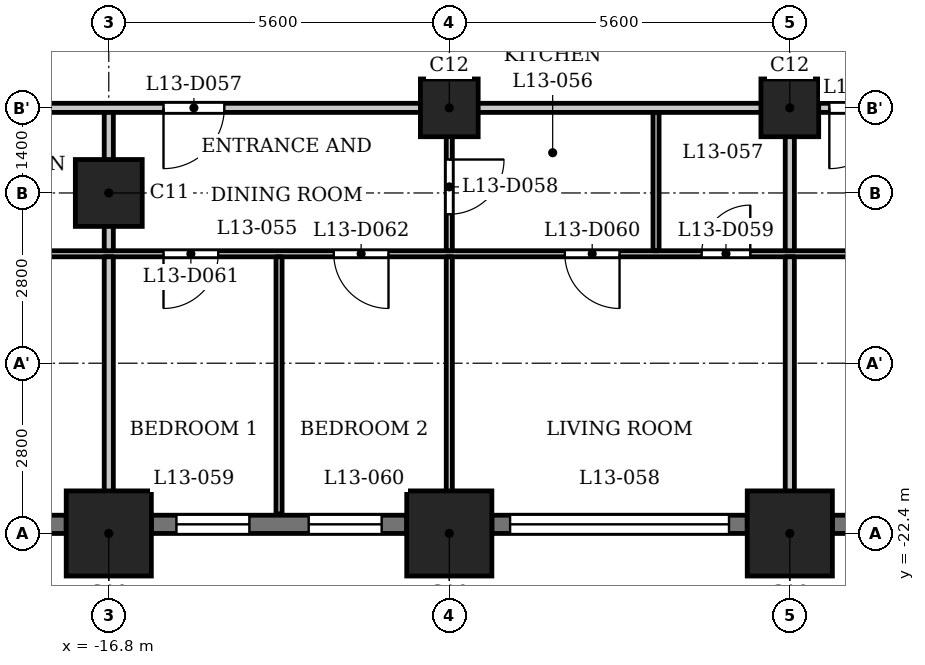
"""IFC4 building model, lengths in metres.
Left out: names, types, materials, properties, quantities, classifications, styles, units other than length and angle.
Written with IfcOpenShell. Run it as: python <this file> out.ifc"""

import sys

from ifc_helpers import new_model, si_unit, direction, frame, frame_2d, origin, origin_2d, place, context, subcontext, project, spatial, rectangle, extrude, element, fill, save


model = new_model("IFC4")
c1 = context("Model", 3, precision=1e-05, world=origin(), true_north=direction((0.0, 1.0)))
c2 = subcontext(c1, "Body", "Model", "MODEL_VIEW")
j1 = project(units=[si_unit("LENGTHUNIT", "METRE"), si_unit("PLANEANGLEUNIT", "RADIAN")], contexts=[c1])
p1 = place(None, origin())
s1 = spatial("IfcSite", under=j1, at=p1, CompositionType="ELEMENT")
p2 = place(p1, origin())
s2 = spatial("IfcBuilding", under=s1, at=p2, CompositionType="ELEMENT")
p3 = place(p2, frame((0.0, 0.0, 55.0)))
s3 = spatial("IfcBuildingStorey", under=s2, at=p3, CompositionType="ELEMENT", Elevation=55.0)
for number, where, z_axis, x_axis in (
    (1, (-16.8, -22.4, 0.0), (0.0, 0.0, 1.0), (1.0, 0.0, 0.0)),
    (2, (-11.2, -22.4, 0.0), (0.0, 0.0, 1.0), (1.0, 0.0, 0.0)),
    (3, (-5.6, -22.4, 0.0), (0.0, 0.0, 1.0), (1.0, 0.0, 0.0)),
):
    element("IfcColumn", number, at=place(p3, frame(where, z_axis=z_axis, x_axis=x_axis)), inside=s3, PredefinedType="COLUMN", context=c2, shape_type="SweptSolid", body=[
        extrude(rectangle(XDim=1.4, YDim=1.4, at=origin_2d()), origin(), (0.0, 0.0, 1.0), 3.5),
    ])
p4 = place(p3, frame((-16.8, -16.8, 0.0), z_axis=(0.0, 0.0, 1.0), x_axis=(1.0, 0.0, 0.0)))
e4 = element("IfcColumn", 4, at=p4, inside=s3, PredefinedType="COLUMN", context=c2, shape_type="SweptSolid", body=[
    extrude(rectangle(XDim=1.1, YDim=1.1, at=origin_2d()), origin(), (0.0, 0.0, 1.0), 3.5),
])
for number, where, z_axis, x_axis in (
    (5, (-11.2, -15.4, 0.0), (0.0, 0.0, 1.0), (1.0, 0.0, 0.0)),
    (6, (-5.6, -15.4, 0.0), (0.0, 0.0, 1.0), (1.0, 0.0, 0.0)),
):
    element("IfcColumn", number, at=place(p3, frame(where, z_axis=z_axis, x_axis=x_axis)), inside=s3, PredefinedType="COLUMN", context=c2, shape_type="SweptSolid", body=[
        extrude(rectangle(XDim=0.95, YDim=0.95, at=origin_2d()), origin(), (0.0, 0.0, 1.0), 3.5),
    ])
p5 = place(p3, frame((-20.0, -22.25, 0.0), z_axis=(0.0, 0.0, 1.0), x_axis=(1.0, 0.0, 0.0)))
e7 = element("IfcWall", 7, at=p5, inside=s3, PredefinedType="SOLIDWALL", context=c2, shape_type="SweptSolid", body=[
    extrude(rectangle(XDim=2.5, YDim=0.3, at=frame_2d((1.25, 0.0))), origin(), (0.0, 0.0, 1.0), 2.35),
])
p6 = place(p5, frame((0.65, 0.0, 0.6)))
e8 = element("IfcOpeningElement", 8, at=p6, cuts=e7, PredefinedType="OPENING", context=c2, shape_type="SweptSolid", body=[
    extrude(rectangle(XDim=1.2, YDim=1.55, at=frame_2d((0.6, 0.775))), frame((0.0, 0.16, 0.0), z_axis=(0.0, -1.0, 0.0), x_axis=(1.0, 0.0, 0.0)), (0.0, 0.0, 1.0), 0.32),
])
p7 = place(p3, frame((-16.1, -22.25, 0.0), z_axis=(0.0, 0.0, 1.0), x_axis=(1.0, 0.0, 0.0)))
e9 = element("IfcWall", 9, at=p7, inside=s3, PredefinedType="SOLIDWALL", context=c2, shape_type="SweptSolid", body=[
    extrude(rectangle(XDim=4.2, YDim=0.3, at=frame_2d((2.1, 0.0))), origin(), (0.0, 0.0, 1.0), 2.35),
])
p8 = place(p7, frame((0.413, 0.0, 0.6)))
e10 = element("IfcOpeningElement", 10, at=p8, cuts=e9, PredefinedType="OPENING", context=c2, shape_type="SweptSolid", body=[
    extrude(rectangle(XDim=1.2, YDim=1.55, at=frame_2d((0.6, 0.775))), frame((0.0, 0.16, 0.0), z_axis=(0.0, -1.0, 0.0), x_axis=(1.0, 0.0, 0.0)), (0.0, 0.0, 1.0), 0.32),
])
p9 = place(p7, frame((2.587, 0.0, 0.6)))
e11 = element("IfcOpeningElement", 11, at=p9, cuts=e9, PredefinedType="OPENING", context=c2, shape_type="SweptSolid", body=[
    extrude(rectangle(XDim=1.2, YDim=1.55, at=frame_2d((0.6, 0.775))), frame((0.0, 0.16, 0.0), z_axis=(0.0, -1.0, 0.0), x_axis=(1.0, 0.0, 0.0)), (0.0, 0.0, 1.0), 0.32),
])
p10 = place(p3, frame((-10.5, -22.25, 0.0), z_axis=(0.0, 0.0, 1.0), x_axis=(1.0, 0.0, 0.0)))
e12 = element("IfcWall", 12, at=p10, inside=s3, PredefinedType="SOLIDWALL", context=c2, shape_type="SweptSolid", body=[
    extrude(rectangle(XDim=4.2, YDim=0.3, at=frame_2d((2.1, 0.0))), origin(), (0.0, 0.0, 1.0), 2.35),
])
p11 = place(p10, frame((0.3, 0.0, 1.2)))
e13 = element("IfcOpeningElement", 13, at=p11, cuts=e12, PredefinedType="OPENING", context=c2, shape_type="SweptSolid", body=[
    extrude(rectangle(XDim=3.6, YDim=0.95, at=frame_2d((1.8, 0.475))), frame((0.0, 0.16, 0.0), z_axis=(0.0, -1.0, 0.0), x_axis=(1.0, 0.0, 0.0)), (0.0, 0.0, 1.0), 0.32),
])
p12 = place(p3, frame((-4.9, -22.25, 0.0), z_axis=(0.0, 0.0, 1.0), x_axis=(1.0, 0.0, 0.0)))
e14 = element("IfcWall", 14, at=p12, inside=s3, PredefinedType="SOLIDWALL", context=c2, shape_type="SweptSolid", body=[
    extrude(rectangle(XDim=4.2, YDim=0.3, at=frame_2d((2.1, 0.0))), origin(), (0.0, 0.0, 1.0), 2.35),
])
p13 = place(p12, frame((0.3, 0.0, 1.2)))
e15 = element("IfcOpeningElement", 15, at=p13, cuts=e14, PredefinedType="OPENING", context=c2, shape_type="SweptSolid", body=[
    extrude(rectangle(XDim=3.6, YDim=0.95, at=frame_2d((1.8, 0.475))), frame((0.0, 0.16, 0.0), z_axis=(0.0, -1.0, 0.0), x_axis=(1.0, 0.0, 0.0)), (0.0, 0.0, 1.0), 0.32),
])
p14 = place(p3, frame((-26.394, -17.8, 0.0), z_axis=(0.0, 0.0, 1.0), x_axis=(1.0, 0.0, 0.0)))
e16 = element("IfcWall", 16, at=p14, inside=s3, PredefinedType="PARTITIONING", context=c2, shape_type="SweptSolid", body=[
    extrude(rectangle(XDim=53.034, YDim=0.1, at=frame_2d((26.517, 0.0))), origin(), (0.0, 0.0, 1.0), 3.2),
])
p15 = place(p14, frame((0.794, 0.0, 0.0)))
e17 = element("IfcOpeningElement", 17, at=p15, cuts=e16, PredefinedType="OPENING", context=c2, shape_type="SweptSolid", body=[
    extrude(rectangle(XDim=0.8, YDim=2.1, at=frame_2d((0.4, 1.05))), frame((0.0, 0.06, 0.0), z_axis=(0.0, -1.0, 0.0), x_axis=(1.0, 0.0, 0.0)), (0.0, 0.0, 1.0), 0.12),
])
p16 = place(p14, frame((5.644, 0.0, 0.0)))
e18 = element("IfcOpeningElement", 18, at=p16, cuts=e16, PredefinedType="OPENING", context=c2, shape_type="SweptSolid", body=[
    extrude(rectangle(XDim=0.9, YDim=2.1, at=frame_2d((0.45, 1.05))), frame((0.0, 0.06, 0.0), z_axis=(0.0, -1.0, 0.0), x_axis=(1.0, 0.0, 0.0)), (0.0, 0.0, 1.0), 0.12),
])
p17 = place(p14, frame((19.344, 0.0, 0.0)))
e19 = element("IfcOpeningElement", 19, at=p17, cuts=e16, PredefinedType="OPENING", context=c2, shape_type="SweptSolid", body=[
    extrude(rectangle(XDim=0.8, YDim=2.1, at=frame_2d((0.4, 1.05))), frame((0.0, 0.06, 0.0), z_axis=(0.0, -1.0, 0.0), x_axis=(1.0, 0.0, 0.0)), (0.0, 0.0, 1.0), 0.12),
])
p18 = place(p14, frame((17.094, 0.0, 0.0)))
e20 = element("IfcOpeningElement", 20, at=p18, cuts=e16, PredefinedType="OPENING", context=c2, shape_type="SweptSolid", body=[
    extrude(rectangle(XDim=0.9, YDim=2.1, at=frame_2d((0.45, 1.05))), frame((0.0, 0.06, 0.0), z_axis=(0.0, -1.0, 0.0), x_axis=(1.0, 0.0, 0.0)), (0.0, 0.0, 1.0), 0.12),
])
p19 = place(p14, frame((10.494, 0.0, 0.0)))
e21 = element("IfcOpeningElement", 21, at=p19, cuts=e16, PredefinedType="OPENING", context=c2, shape_type="SweptSolid", body=[
    extrude(rectangle(XDim=0.9, YDim=2.1, at=frame_2d((0.45, 1.05))), frame((0.0, 0.06, 0.0), z_axis=(0.0, -1.0, 0.0), x_axis=(1.0, 0.0, 0.0)), (0.0, 0.0, 1.0), 0.12),
])
p20 = place(p14, frame((13.294, 0.0, 0.0)))
e22 = element("IfcOpeningElement", 22, at=p20, cuts=e16, PredefinedType="OPENING", context=c2, shape_type="SweptSolid", body=[
    extrude(rectangle(XDim=0.9, YDim=2.1, at=frame_2d((0.45, 1.05))), frame((0.0, 0.06, 0.0), z_axis=(0.0, -1.0, 0.0), x_axis=(1.0, 0.0, 0.0)), (0.0, 0.0, 1.0), 0.12),
])
p21 = place(p14, frame((27.044, 0.0, 0.0)))
e23 = element("IfcOpeningElement", 23, at=p21, cuts=e16, PredefinedType="OPENING", context=c2, shape_type="SweptSolid", body=[
    extrude(rectangle(XDim=0.8, YDim=2.1, at=frame_2d((0.4, 1.05))), frame((0.0, 0.06, 0.0), z_axis=(0.0, -1.0, 0.0), x_axis=(1.0, 0.0, 0.0)), (0.0, 0.0, 1.0), 0.12),
])
p22 = place(p14, frame((22.444, 0.0, 0.0)))
e24 = element("IfcOpeningElement", 24, at=p22, cuts=e16, PredefinedType="OPENING", context=c2, shape_type="SweptSolid", body=[
    extrude(rectangle(XDim=0.9, YDim=2.1, at=frame_2d((0.45, 1.05))), frame((0.0, 0.06, 0.0), z_axis=(0.0, -1.0, 0.0), x_axis=(1.0, 0.0, 0.0)), (0.0, 0.0, 1.0), 0.12),
])
p23 = place(p14, frame((36.144, 0.0, 0.0)))
e25 = element("IfcOpeningElement", 25, at=p23, cuts=e16, PredefinedType="OPENING", context=c2, shape_type="SweptSolid", body=[
    extrude(rectangle(XDim=0.8, YDim=2.1, at=frame_2d((0.4, 1.05))), frame((0.0, 0.06, 0.0), z_axis=(0.0, -1.0, 0.0), x_axis=(1.0, 0.0, 0.0)), (0.0, 0.0, 1.0), 0.12),
])
p24 = place(p14, frame((33.644, 0.0, 0.0)))
e26 = element("IfcOpeningElement", 26, at=p24, cuts=e16, PredefinedType="OPENING", context=c2, shape_type="SweptSolid", body=[
    extrude(rectangle(XDim=0.9, YDim=2.1, at=frame_2d((0.45, 1.05))), frame((0.0, 0.06, 0.0), z_axis=(0.0, -1.0, 0.0), x_axis=(1.0, 0.0, 0.0)), (0.0, 0.0, 1.0), 0.12),
])
p25 = place(p14, frame((39.144, 0.0, 0.0)))
e27 = element("IfcOpeningElement", 27, at=p25, cuts=e16, PredefinedType="OPENING", context=c2, shape_type="SweptSolid", body=[
    extrude(rectangle(XDim=0.8, YDim=2.1, at=frame_2d((0.4, 1.05))), frame((0.0, 0.06, 0.0), z_axis=(0.0, -1.0, 0.0), x_axis=(1.0, 0.0, 0.0)), (0.0, 0.0, 1.0), 0.12),
])
p26 = place(p14, frame((41.494, 0.0, 0.0)))
e28 = element("IfcOpeningElement", 28, at=p26, cuts=e16, PredefinedType="OPENING", context=c2, shape_type="SweptSolid", body=[
    extrude(rectangle(XDim=0.9, YDim=2.1, at=frame_2d((0.45, 1.05))), frame((0.0, 0.06, 0.0), z_axis=(0.0, -1.0, 0.0), x_axis=(1.0, 0.0, 0.0)), (0.0, 0.0, 1.0), 0.12),
])
p27 = place(p14, frame((49.362, 0.0, 0.0)))
e29 = element("IfcOpeningElement", 29, at=p27, cuts=e16, PredefinedType="OPENING", context=c2, shape_type="SweptSolid", body=[
    extrude(rectangle(XDim=0.8, YDim=2.1, at=frame_2d((0.4, 1.05))), frame((0.0, 0.06, 0.0), z_axis=(0.0, -1.0, 0.0), x_axis=(1.0, 0.0, 0.0)), (0.0, 0.0, 1.0), 0.12),
])
p28 = place(p14, frame((45.094, 0.0, 0.0)))
e30 = element("IfcOpeningElement", 30, at=p28, cuts=e16, PredefinedType="OPENING", context=c2, shape_type="SweptSolid", body=[
    extrude(rectangle(XDim=0.9, YDim=2.1, at=frame_2d((0.45, 1.05))), frame((0.0, 0.06, 0.0), z_axis=(0.0, -1.0, 0.0), x_axis=(1.0, 0.0, 0.0)), (0.0, 0.0, 1.0), 0.12),
])
p29 = place(p3, frame((-27.484, -15.4, 0.0), z_axis=(0.0, 0.0, 1.0), x_axis=(1.0, 0.0, 0.0)))
e31 = element("IfcWall", 31, at=p29, inside=s3, PredefinedType="PARTITIONING", context=c2, shape_type="SweptSolid", body=[
    extrude(rectangle(XDim=54.968, YDim=0.15, at=frame_2d((27.484, 0.0))), origin(), (0.0, 0.0, 1.0), 3.2),
])
p30 = place(p29, frame((5.734, 0.0, 0.0)))
e32 = element("IfcOpeningElement", 32, at=p30, cuts=e31, PredefinedType="OPENING", context=c2, shape_type="SweptSolid", body=[
    extrude(rectangle(XDim=1.0, YDim=2.1, at=frame_2d((0.5, 1.05))), frame((0.0, 0.085, 0.0), z_axis=(0.0, -1.0, 0.0), x_axis=(1.0, 0.0, 0.0)), (0.0, 0.0, 1.0), 0.17),
])
p31 = place(p29, frame((11.584, 0.0, 0.0)))
e33 = element("IfcOpeningElement", 33, at=p31, cuts=e31, PredefinedType="OPENING", context=c2, shape_type="SweptSolid", body=[
    extrude(rectangle(XDim=1.0, YDim=2.1, at=frame_2d((0.5, 1.05))), frame((0.0, 0.085, 0.0), z_axis=(0.0, -1.0, 0.0), x_axis=(1.0, 0.0, 0.0)), (0.0, 0.0, 1.0), 0.17),
])
p32 = place(p29, frame((22.534, 0.0, 0.0)))
e34 = element("IfcOpeningElement", 34, at=p32, cuts=e31, PredefinedType="OPENING", context=c2, shape_type="SweptSolid", body=[
    extrude(rectangle(XDim=1.0, YDim=2.1, at=frame_2d((0.5, 1.05))), frame((0.0, 0.085, 0.0), z_axis=(0.0, -1.0, 0.0), x_axis=(1.0, 0.0, 0.0)), (0.0, 0.0, 1.0), 0.17),
])
p33 = place(p29, frame((33.734, 0.0, 0.0)))
e35 = element("IfcOpeningElement", 35, at=p33, cuts=e31, PredefinedType="OPENING", context=c2, shape_type="SweptSolid", body=[
    extrude(rectangle(XDim=1.0, YDim=2.1, at=frame_2d((0.5, 1.05))), frame((0.0, 0.085, 0.0), z_axis=(0.0, -1.0, 0.0), x_axis=(1.0, 0.0, 0.0)), (0.0, 0.0, 1.0), 0.17),
])
p34 = place(p29, frame((42.334, 0.0, 0.0)))
e36 = element("IfcOpeningElement", 36, at=p34, cuts=e31, PredefinedType="OPENING", context=c2, shape_type="SweptSolid", body=[
    extrude(rectangle(XDim=1.0, YDim=2.1, at=frame_2d((0.5, 1.05))), frame((0.0, 0.085, 0.0), z_axis=(0.0, -1.0, 0.0), x_axis=(1.0, 0.0, 0.0)), (0.0, 0.0, 1.0), 0.17),
])
p35 = place(p29, frame((45.184, 0.0, 0.0)))
e37 = element("IfcOpeningElement", 37, at=p35, cuts=e31, PredefinedType="OPENING", context=c2, shape_type="SweptSolid", body=[
    extrude(rectangle(XDim=1.0, YDim=2.1, at=frame_2d((0.5, 1.05))), frame((0.0, 0.085, 0.0), z_axis=(0.0, -1.0, 0.0), x_axis=(1.0, 0.0, 0.0)), (0.0, 0.0, 1.0), 0.17),
])
p36 = place(p3, frame((-16.8, -23.08, 0.0), z_axis=(0.0, 0.0, 1.0), x_axis=(0.0, 1.0, 0.0)))
e38 = element("IfcWall", 38, at=p36, inside=s3, PredefinedType="PARTITIONING", context=c2, shape_type="SweptSolid", body=[
    extrude(rectangle(XDim=5.23, YDim=0.15, at=frame_2d((2.615, 0.0))), origin(), (0.0, 0.0, 1.0), 3.2),
])
p37 = place(p3, frame((-16.8, -17.75, 0.0), z_axis=(0.0, 0.0, 1.0), x_axis=(0.0, 1.0, 0.0)))
e39 = element("IfcWall", 39, at=p37, inside=s3, PredefinedType="PARTITIONING", context=c2, shape_type="SweptSolid", body=[
    extrude(rectangle(XDim=2.275, YDim=0.15, at=frame_2d((1.137, 0.0))), origin(), (0.0, 0.0, 1.0), 3.2),
])
p38 = place(p3, frame((-14.0, -22.08, 0.0), z_axis=(0.0, 0.0, 1.0), x_axis=(0.0, 1.0, 0.0)))
e40 = element("IfcWall", 40, at=p38, inside=s3, PredefinedType="PARTITIONING", context=c2, shape_type="SweptSolid", body=[
    extrude(rectangle(XDim=4.23, YDim=0.1, at=frame_2d((2.115, 0.0))), origin(), (0.0, 0.0, 1.0), 3.2),
])
p39 = place(p3, frame((-11.2, -23.08, 0.0), z_axis=(0.0, 0.0, 1.0), x_axis=(0.0, 1.0, 0.0)))
e41 = element("IfcWall", 41, at=p39, inside=s3, PredefinedType="PARTITIONING", context=c2, shape_type="SweptSolid", body=[
    extrude(rectangle(XDim=5.23, YDim=0.1, at=frame_2d((2.615, 0.0))), origin(), (0.0, 0.0, 1.0), 3.2),
])
p40 = place(p3, frame((-11.2, -17.75, 0.0), z_axis=(0.0, 0.0, 1.0), x_axis=(0.0, 1.0, 0.0)))
e42 = element("IfcWall", 42, at=p40, inside=s3, PredefinedType="PARTITIONING", context=c2, shape_type="SweptSolid", body=[
    extrude(rectangle(XDim=2.275, YDim=0.1, at=frame_2d((1.137, 0.0))), origin(), (0.0, 0.0, 1.0), 3.2),
])
p41 = place(p40, frame((0.6, 0.0, 0.0)))
e43 = element("IfcOpeningElement", 43, at=p41, cuts=e42, PredefinedType="OPENING", context=c2, shape_type="SweptSolid", body=[
    extrude(rectangle(XDim=0.9, YDim=2.1, at=frame_2d((0.45, 1.05))), frame((0.0, 0.06, 0.0), z_axis=(0.0, -1.0, 0.0), x_axis=(1.0, 0.0, 0.0)), (0.0, 0.0, 1.0), 0.12),
])
p42 = place(p3, frame((-7.8, -17.75, 0.0), z_axis=(0.0, 0.0, 1.0), x_axis=(0.0, 1.0, 0.0)))
e44 = element("IfcWall", 44, at=p42, inside=s3, PredefinedType="PARTITIONING", context=c2, shape_type="SweptSolid", body=[
    extrude(rectangle(XDim=2.275, YDim=0.1, at=frame_2d((1.137, 0.0))), origin(), (0.0, 0.0, 1.0), 3.2),
])
p43 = place(p3, frame((-5.6, -23.08, 0.0), z_axis=(0.0, 0.0, 1.0), x_axis=(0.0, 1.0, 0.0)))
e45 = element("IfcWall", 45, at=p43, inside=s3, PredefinedType="PARTITIONING", context=c2, shape_type="SweptSolid", body=[
    extrude(rectangle(XDim=5.23, YDim=0.15, at=frame_2d((2.615, 0.0))), origin(), (0.0, 0.0, 1.0), 3.2),
])
p44 = place(p3, frame((-5.6, -17.75, 0.0), z_axis=(0.0, 0.0, 1.0), x_axis=(0.0, 1.0, 0.0)))
e46 = element("IfcWall", 46, at=p44, inside=s3, PredefinedType="PARTITIONING", context=c2, shape_type="SweptSolid", body=[
    extrude(rectangle(XDim=2.275, YDim=0.15, at=frame_2d((1.137, 0.0))), origin(), (0.0, 0.0, 1.0), 3.2),
])
p45 = place(p31, origin())
e47 = element("IfcDoor", 47, at=p45, inside=s3, OperationType="SINGLE_SWING_LEFT", PredefinedType="DOOR", context=c2, shape_type="SweptSolid", body=[
    extrude(rectangle(XDim=1.0, YDim=2.1, at=frame_2d((0.5, 1.05))), frame((0.0, 0.025, 0.0), z_axis=(0.0, -1.0, 0.0), x_axis=(1.0, 0.0, 0.0)), (0.0, 0.0, 1.0), 0.05),
])
fill(e33, e47)
p46 = place(p41, origin())
e48 = element("IfcDoor", 48, at=p46, inside=s3, OperationType="SINGLE_SWING_RIGHT", PredefinedType="DOOR", context=c2, shape_type="SweptSolid", body=[
    extrude(rectangle(XDim=0.9, YDim=2.1, at=frame_2d((0.45, 1.05))), frame((0.0, 0.025, 0.0), z_axis=(0.0, -1.0, 0.0), x_axis=(1.0, 0.0, 0.0)), (0.0, 0.0, 1.0), 0.05),
])
fill(e43, e48)
p47 = place(p17, origin())
e49 = element("IfcDoor", 49, at=p47, inside=s3, OperationType="SINGLE_SWING_LEFT", PredefinedType="DOOR", context=c2, shape_type="SweptSolid", body=[
    extrude(rectangle(XDim=0.8, YDim=2.1, at=frame_2d((0.4, 1.05))), frame((0.0, 0.025, 0.0), z_axis=(0.0, -1.0, 0.0), x_axis=(1.0, 0.0, 0.0)), (0.0, 0.0, 1.0), 0.05),
])
fill(e19, e49)
p48 = place(p18, origin())
e50 = element("IfcDoor", 50, at=p48, inside=s3, OperationType="SINGLE_SWING_RIGHT", PredefinedType="DOOR", context=c2, shape_type="SweptSolid", body=[
    extrude(rectangle(XDim=0.9, YDim=2.1, at=frame_2d((0.45, 1.05))), frame((0.0, 0.025, 0.0), z_axis=(0.0, -1.0, 0.0), x_axis=(1.0, 0.0, 0.0)), (0.0, 0.0, 1.0), 0.05),
])
fill(e20, e50)
p49 = place(p19, origin())
e51 = element("IfcDoor", 51, at=p49, inside=s3, OperationType="SINGLE_SWING_LEFT", PredefinedType="DOOR", context=c2, shape_type="SweptSolid", body=[
    extrude(rectangle(XDim=0.9, YDim=2.1, at=frame_2d((0.45, 1.05))), frame((0.0, 0.025, 0.0), z_axis=(0.0, -1.0, 0.0), x_axis=(1.0, 0.0, 0.0)), (0.0, 0.0, 1.0), 0.05),
])
fill(e21, e51)
p50 = place(p20, origin())
e52 = element("IfcDoor", 52, at=p50, inside=s3, OperationType="SINGLE_SWING_RIGHT", PredefinedType="DOOR", context=c2, shape_type="SweptSolid", body=[
    extrude(rectangle(XDim=0.9, YDim=2.1, at=frame_2d((0.45, 1.05))), frame((0.0, 0.025, 0.0), z_axis=(0.0, -1.0, 0.0), x_axis=(1.0, 0.0, 0.0)), (0.0, 0.0, 1.0), 0.05),
])
fill(e22, e52)
p51 = place(p32, origin())
e53 = element("IfcDoor", 53, at=p51, inside=s3, OperationType="SINGLE_SWING_LEFT", PredefinedType="DOOR", context=c2, shape_type="SweptSolid", body=[
    extrude(rectangle(XDim=1.0, YDim=2.1, at=frame_2d((0.5, 1.05))), frame((0.0, 0.025, 0.0), z_axis=(0.0, -1.0, 0.0), x_axis=(1.0, 0.0, 0.0)), (0.0, 0.0, 1.0), 0.05),
])
fill(e34, e53)
p52 = place(p8, origin())
e54 = element("IfcWindow", 54, at=p52, inside=s3, PartitioningType="SINGLE_PANEL", PredefinedType="WINDOW", context=c2, shape_type="SweptSolid", body=[
    extrude(rectangle(XDim=1.2, YDim=1.55, at=frame_2d((0.6, 0.775))), frame((0.0, 0.03, 0.0), z_axis=(0.0, -1.0, 0.0), x_axis=(1.0, 0.0, 0.0)), (0.0, 0.0, 1.0), 0.06),
])
fill(e10, e54)
p53 = place(p9, origin())
e55 = element("IfcWindow", 55, at=p53, inside=s3, PartitioningType="SINGLE_PANEL", PredefinedType="WINDOW", context=c2, shape_type="SweptSolid", body=[
    extrude(rectangle(XDim=1.2, YDim=1.55, at=frame_2d((0.6, 0.775))), frame((0.0, 0.03, 0.0), z_axis=(0.0, -1.0, 0.0), x_axis=(1.0, 0.0, 0.0)), (0.0, 0.0, 1.0), 0.06),
])
fill(e11, e55)
p54 = place(p11, origin())
e56 = element("IfcWindow", 56, at=p54, inside=s3, PartitioningType="SINGLE_PANEL", PredefinedType="WINDOW", context=c2, shape_type="SweptSolid", body=[
    extrude(rectangle(XDim=3.6, YDim=0.95, at=frame_2d((1.8, 0.475))), frame((0.0, 0.03, 0.0), z_axis=(0.0, -1.0, 0.0), x_axis=(1.0, 0.0, 0.0)), (0.0, 0.0, 1.0), 0.06),
])
fill(e13, e56)
save(model, sys.argv[1])
